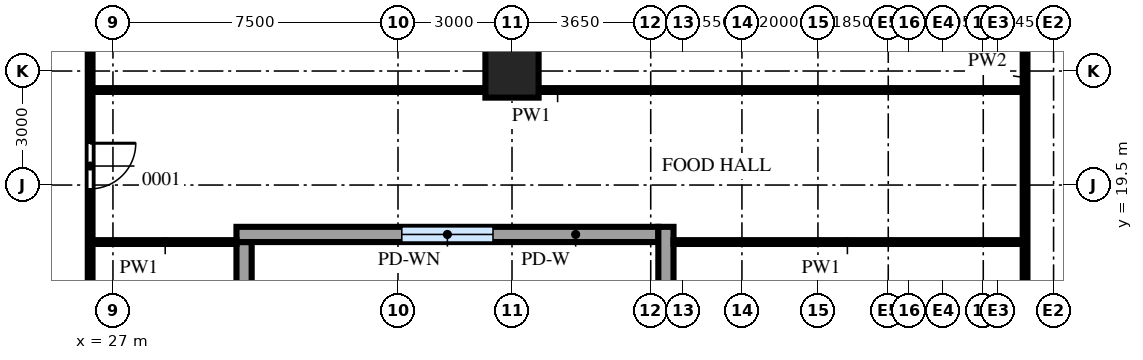
"""IFC4 building model, lengths in metres.
Left out: names, types, materials, properties, quantities, classifications, styles, units other than length and angle.
Written with IfcOpenShell. Run it as: python <this file> out.ifc"""

import sys

from ifc_helpers import new_model, si_unit, direction, frame, frame_2d, origin, origin_2d, place, context, subcontext, project, spatial, rectangle, extrude, source, transform, mapped, element, fill, save


model = new_model("IFC4")
c1 = context("Model", 3, precision=1e-05, world=origin(), true_north=direction((0.0, 1.0)))
c2 = subcontext(c1, "Body", "Model", "MODEL_VIEW")
j1 = project(units=[si_unit("LENGTHUNIT", "METRE"), si_unit("PLANEANGLEUNIT", "RADIAN")], contexts=[c1])
p1 = place(None, origin())
s1 = spatial("IfcSite", under=j1, at=p1, CompositionType="ELEMENT")
p2 = place(p1, origin())
s2 = spatial("IfcBuilding", under=s1, at=p2, CompositionType="ELEMENT")
p3 = place(p2, frame((0.0, 0.0, 18.5)))
s3 = spatial("IfcBuildingStorey", under=s2, at=p3, CompositionType="ELEMENT", Elevation=18.5)
m1 = source(origin(), c2, "Body", "SweptSolid", [
    extrude(rectangle(XDim=1.4, YDim=1.4, at=origin_2d()), origin(), (0.0, 0.0, 1.0), 4.7),
])
p4 = place(p3, frame((37.5, 22.5, 0.0), z_axis=(0.0, 0.0, 1.0), x_axis=(1.0, 0.0, 0.0)))
e1 = element("IfcColumn", 1, at=p4, inside=s3, PredefinedType="COLUMN", context=c2, shape_type="MappedRepresentation", body=[
    mapped(m1, transform((0.0, 0.0, 0.0))),
])
m2 = source(origin(), c2, "Body", "SweptSolid", [
    extrude(rectangle(XDim=17.6, YDim=0.4, at=frame_2d((8.8, 0.0))), origin(), (0.0, 0.0, 1.0), 4.7),
])
p5 = place(p3, frame((30.45, 0.4, 0.0), z_axis=(0.0, 0.0, 1.0), x_axis=(0.0, 1.0, 0.0)))
e2 = element("IfcWall", 2, at=p5, inside=s3, PredefinedType="SOLIDWALL", context=c2, shape_type="MappedRepresentation", body=[
    mapped(m2, transform((0.0, 0.0, 0.0))),
])
m3 = source(origin(), c2, "Body", "SweptSolid", [
    extrude(rectangle(XDim=2.4, YDim=2.4, at=frame_2d((1.2, 1.2))), frame((0.0, 0.21, 0.0), z_axis=(0.0, -1.0, 0.0), x_axis=(1.0, 0.0, 0.0)), (0.0, 0.0, 1.0), 0.42),
])
p6 = place(p5, frame((1.6, 0.0, 1.0)))
e3 = element("IfcOpeningElement", 3, at=p6, cuts=e2, PredefinedType="OPENING", context=c2, shape_type="MappedRepresentation", body=[
    mapped(m3, transform((0.0, 0.0, 0.0))),
])
p7 = place(p5, frame((7.6, 0.0, 1.0)))
e4 = element("IfcOpeningElement", 4, at=p7, cuts=e2, PredefinedType="OPENING", context=c2, shape_type="MappedRepresentation", body=[
    mapped(m3, transform((0.0, 0.0, 0.0))),
])
p8 = place(p5, frame((13.6, 0.0, 1.0)))
e5 = element("IfcOpeningElement", 5, at=p8, cuts=e2, PredefinedType="OPENING", context=c2, shape_type="MappedRepresentation", body=[
    mapped(m3, transform((0.0, 0.0, 0.0))),
])
m4 = source(origin(), c2, "Body", "SweptSolid", [
    extrude(rectangle(XDim=11.1, YDim=0.4, at=frame_2d((5.55, 0.0))), origin(), (0.0, 0.0, 1.0), 4.7),
])
p9 = place(p3, frame((30.25, 18.2, 0.0), z_axis=(0.0, 0.0, 1.0), x_axis=(1.0, 0.0, 0.0)))
e6 = element("IfcWall", 6, at=p9, inside=s3, PredefinedType="SOLIDWALL", context=c2, shape_type="MappedRepresentation", body=[
    mapped(m4, transform((0.0, 0.0, 0.0))),
])
p10 = place(p9, frame((4.35, 0.0, 1.0)))
e7 = element("IfcOpeningElement", 7, at=p10, cuts=e6, PredefinedType="OPENING", context=c2, shape_type="MappedRepresentation", body=[
    mapped(m3, transform((0.0, 0.0, 0.0))),
])
m5 = source(origin(), c2, "Body", "SweptSolid", [
    extrude(rectangle(XDim=18.4, YDim=0.4, at=frame_2d((9.2, 0.0))), origin(), (0.0, 0.0, 1.0), 4.7),
])
p11 = place(p3, frame((41.55, 18.4, 0.0), z_axis=(0.0, 0.0, 1.0), x_axis=(0.0, -1.0, 0.0)))
e8 = element("IfcWall", 8, at=p11, inside=s3, PredefinedType="SOLIDWALL", context=c2, shape_type="MappedRepresentation", body=[
    mapped(m5, transform((0.0, 0.0, 0.0))),
])
p12 = place(p11, frame((2.0, 0.0, 1.0)))
e9 = element("IfcOpeningElement", 9, at=p12, cuts=e8, PredefinedType="OPENING", context=c2, shape_type="MappedRepresentation", body=[
    mapped(m3, transform((0.0, 0.0, 0.0))),
])
p13 = place(p11, frame((8.0, 0.0, 1.0)))
e10 = element("IfcOpeningElement", 10, at=p13, cuts=e8, PredefinedType="OPENING", context=c2, shape_type="MappedRepresentation", body=[
    mapped(m3, transform((0.0, 0.0, 0.0))),
])
p14 = place(p11, frame((14.0, 0.0, 1.0)))
e11 = element("IfcOpeningElement", 11, at=p14, cuts=e8, PredefinedType="OPENING", context=c2, shape_type="MappedRepresentation", body=[
    mapped(m3, transform((0.0, 0.0, 0.0))),
])
m6 = source(origin(), c2, "Body", "SweptSolid", [
    extrude(rectangle(XDim=29.7, YDim=0.125, at=frame_2d((14.85, 0.0))), origin(), (0.0, 0.0, 1.0), 4.7),
])
p15 = place(p3, frame((51.0, 3.6, 0.0), z_axis=(0.0, 0.0, 1.0), x_axis=(0.0, 1.0, 0.0)))
e12 = element("IfcWall", 12, at=p15, inside=s3, PredefinedType="PARTITIONING", context=c2, shape_type="MappedRepresentation", body=[
    mapped(m6, transform((0.0, 0.0, 0.0))),
])
m7 = source(origin(), c2, "Body", "SweptSolid", [
    extrude(rectangle(XDim=1.2, YDim=2.1, at=frame_2d((0.6, 1.05))), frame((0.0, 0.073, 0.0), z_axis=(0.0, -1.0, 0.0), x_axis=(1.0, 0.0, 0.0)), (0.0, 0.0, 1.0), 0.145),
])
p16 = place(p15, frame((6.55, 0.0, 0.0)))
e13 = element("IfcOpeningElement", 13, at=p16, cuts=e12, PredefinedType="OPENING", context=c2, shape_type="MappedRepresentation", body=[
    mapped(m7, transform((0.0, 0.0, 0.0))),
])
m8 = source(origin(), c2, "Body", "SweptSolid", [
    extrude(rectangle(XDim=27.15, YDim=0.125, at=frame_2d((13.575, 0.0))), origin(), (0.0, 0.0, 1.0), 4.7),
])
p17 = place(p3, frame((26.4, 6.15, 0.0), z_axis=(0.0, 0.0, 1.0), x_axis=(0.0, 1.0, 0.0)))
e14 = element("IfcWall", 14, at=p17, inside=s3, PredefinedType="PARTITIONING", context=c2, shape_type="MappedRepresentation", body=[
    mapped(m8, transform((0.0, 0.0, 0.0))),
])
p18 = place(p17, frame((5.4, 0.0, 0.0)))
e15 = element("IfcOpeningElement", 15, at=p18, cuts=e14, PredefinedType="OPENING", context=c2, shape_type="MappedRepresentation", body=[
    mapped(m7, transform((0.0, 0.0, 0.0))),
])
p19 = place(p17, frame((13.25, 0.0, 0.0)))
e16 = element("IfcOpeningElement", 16, at=p19, cuts=e14, PredefinedType="OPENING", context=c2, shape_type="MappedRepresentation", body=[
    mapped(m7, transform((0.0, 0.0, 0.0))),
])
m9 = source(origin(), c2, "Body", "SweptSolid", [
    extrude(rectangle(XDim=3.75, YDim=0.1, at=frame_2d((1.875, 0.0))), origin(), (0.0, 0.0, 1.0), 4.7),
])
p20 = place(p3, frame((26.5, 18.0, 0.0), z_axis=(0.0, 0.0, 1.0), x_axis=(1.0, 0.0, 0.0)))
e17 = element("IfcWall", 17, at=p20, inside=s3, PredefinedType="PARTITIONING", context=c2, shape_type="MappedRepresentation", body=[
    mapped(m9, transform((0.0, 0.0, 0.0))),
])
m10 = source(origin(), c2, "Body", "SweptSolid", [
    extrude(rectangle(XDim=9.15, YDim=0.1, at=frame_2d((4.575, 0.0))), origin(), (0.0, 0.0, 1.0), 4.7),
])
p21 = place(p3, frame((41.75, 18.0, 0.0), z_axis=(0.0, 0.0, 1.0), x_axis=(1.0, 0.0, 0.0)))
e18 = element("IfcWall", 18, at=p21, inside=s3, PredefinedType="PARTITIONING", context=c2, shape_type="MappedRepresentation", body=[
    mapped(m10, transform((0.0, 0.0, 0.0))),
])
m11 = source(origin(), c2, "Body", "SweptSolid", [
    extrude(rectangle(XDim=24.4, YDim=0.1, at=frame_2d((12.2, 0.0))), origin(), (0.0, 0.0, 1.0), 4.7),
])
p22 = place(p3, frame((26.5, 22.0, 0.0), z_axis=(0.0, 0.0, 1.0), x_axis=(1.0, 0.0, 0.0)))
e19 = element("IfcWall", 19, at=p22, inside=s3, PredefinedType="PARTITIONING", context=c2, shape_type="MappedRepresentation", body=[
    mapped(m11, transform((0.0, 0.0, 0.0))),
])
m12 = source(origin(), c2, "Body", "SweptSolid", [
    extrude(rectangle(XDim=2.4, YDim=2.4, at=frame_2d((1.2, 1.2))), frame((0.0, 0.03, 0.0), z_axis=(0.0, -1.0, 0.0), x_axis=(1.0, 0.0, 0.0)), (0.0, 0.0, 1.0), 0.06),
])
p23 = place(p10, origin())
e20 = element("IfcWindow", 20, at=p23, inside=s3, PartitioningType="SINGLE_PANEL", PredefinedType="WINDOW", context=c2, shape_type="MappedRepresentation", body=[
    mapped(m12, transform((0.0, 0.0, 0.0))),
])
fill(e7, e20)
m13 = source(origin(), c2, "Body", "SweptSolid", [
    extrude(rectangle(XDim=1.2, YDim=2.1, at=frame_2d((0.6, 1.05))), frame((0.0, 0.025, 0.0), z_axis=(0.0, -1.0, 0.0), x_axis=(1.0, 0.0, 0.0)), (0.0, 0.0, 1.0), 0.05),
])
p24 = place(p19, origin())
e21 = element("IfcDoor", 21, at=p24, inside=s3, OperationType="SINGLE_SWING_RIGHT", PredefinedType="DOOR", context=c2, shape_type="MappedRepresentation", body=[
    mapped(m13, transform((0.0, 0.0, 0.0))),
])
fill(e16, e21)
save(model, sys.argv[1])
